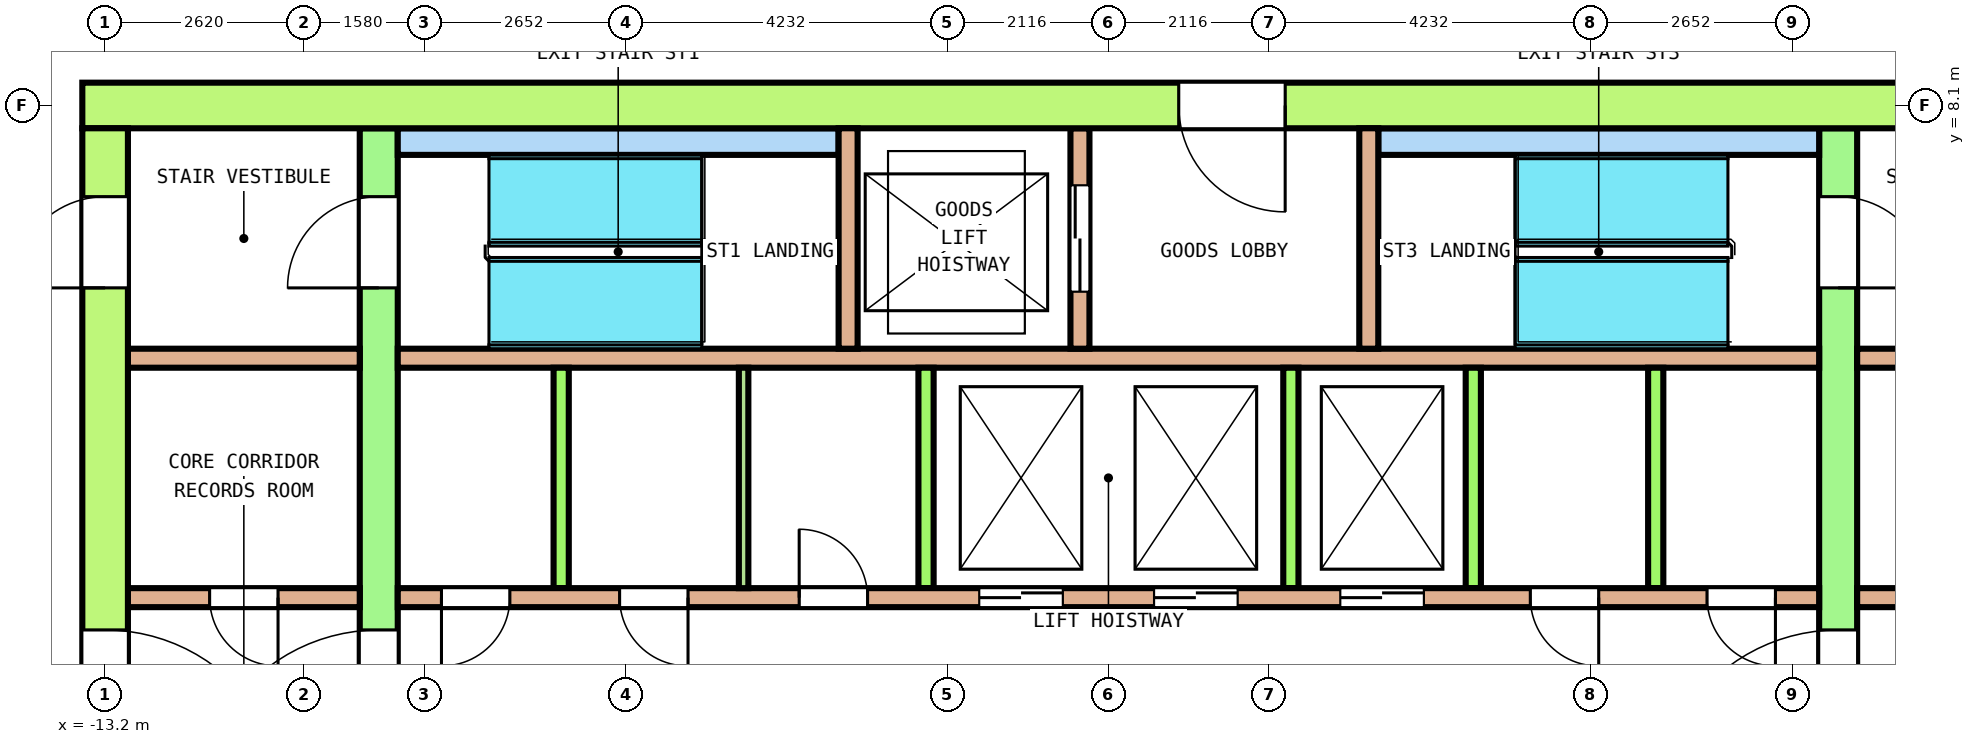
"""IFC4 building model, lengths in metres.
Left out: names, types, materials, properties, quantities, classifications, styles, units other than length and angle.
Written with IfcOpenShell. Run it as: python <this file> out.ifc"""

import sys

from ifc_helpers import new_model, si_unit, direction, frame, frame_2d, origin, place, context, subcontext, project, spatial, rectangle, extrude, element, fill, save


model = new_model("IFC4")
c1 = context("Model", 3, precision=1e-05, world=origin(), true_north=direction((0.0, 1.0)))
c2 = subcontext(c1, "Body", "Model", "MODEL_VIEW")
j1 = project(units=[si_unit("LENGTHUNIT", "METRE"), si_unit("PLANEANGLEUNIT", "RADIAN")], contexts=[c1])
p1 = place(None, origin())
s1 = spatial("IfcSite", under=j1, at=p1, CompositionType="ELEMENT")
p2 = place(p1, origin())
s2 = spatial("IfcBuilding", under=s1, at=p2, CompositionType="ELEMENT")
p3 = place(p2, frame((0.0, 0.0, 241.4)))
s3 = spatial("IfcBuildingStorey", under=s2, at=p3, CompositionType="ELEMENT", Elevation=241.4)
p4 = place(p3, frame((-13.5, 8.1, 0.0), z_axis=(0.0, 0.0, 1.0), x_axis=(1.0, 0.0, 0.0)))
e1 = element("IfcWall", 1, at=p4, inside=s3, PredefinedType="SHEAR", context=c2, shape_type="SweptSolid", body=[
    extrude(rectangle(XDim=27.0, YDim=0.6, at=frame_2d((13.5, 0.0))), origin(), (0.0, 0.0, 1.0), 3.7),
])
p5 = place(p4, frame((14.425, 0.0, 0.0)))
e2 = element("IfcOpeningElement", 2, at=p5, cuts=e1, PredefinedType="OPENING", context=c2, shape_type="SweptSolid", body=[
    extrude(rectangle(XDim=1.4, YDim=2.1, at=frame_2d((0.7, 1.05))), frame((0.0, 0.31, 0.0), z_axis=(0.0, -1.0, 0.0), x_axis=(1.0, 0.0, 0.0)), (0.0, 0.0, 1.0), 0.62),
])
p6 = place(p3, frame((-13.2, -7.8, 0.0), z_axis=(0.0, 0.0, 1.0), x_axis=(0.0, 1.0, 0.0)))
e3 = element("IfcWall", 3, at=p6, inside=s3, PredefinedType="SHEAR", context=c2, shape_type="SweptSolid", body=[
    extrude(rectangle(XDim=15.6, YDim=0.6, at=frame_2d((7.8, 0.0))), origin(), (0.0, 0.0, 1.0), 3.7),
])
p7 = place(p6, frame((6.6, 0.0, 0.0)))
e4 = element("IfcOpeningElement", 4, at=p7, cuts=e3, PredefinedType="OPENING", context=c2, shape_type="SweptSolid", body=[
    extrude(rectangle(XDim=2.4, YDim=2.1, at=frame_2d((1.2, 1.05))), frame((0.0, 0.31, 0.0), z_axis=(0.0, -1.0, 0.0), x_axis=(1.0, 0.0, 0.0)), (0.0, 0.0, 1.0), 0.62),
])
p8 = place(p6, frame((13.5, 0.0, 0.0)))
e5 = element("IfcOpeningElement", 5, at=p8, cuts=e3, PredefinedType="OPENING", context=c2, shape_type="SweptSolid", body=[
    extrude(rectangle(XDim=1.2, YDim=2.1, at=frame_2d((0.6, 1.05))), frame((0.0, 0.31, 0.0), z_axis=(0.0, -1.0, 0.0), x_axis=(1.0, 0.0, 0.0)), (0.0, 0.0, 1.0), 0.62),
])
p9 = place(p6, frame((0.9, 0.0, 0.0)))
e6 = element("IfcOpeningElement", 6, at=p9, cuts=e3, PredefinedType="OPENING", context=c2, shape_type="SweptSolid", body=[
    extrude(rectangle(XDim=1.2, YDim=2.1, at=frame_2d((0.6, 1.05))), frame((0.0, 0.31, 0.0), z_axis=(0.0, -1.0, 0.0), x_axis=(1.0, 0.0, 0.0)), (0.0, 0.0, 1.0), 0.62),
])
p10 = place(p3, frame((-9.6, -7.8, 0.0), z_axis=(0.0, 0.0, 1.0), x_axis=(0.0, 1.0, 0.0)))
e7 = element("IfcWall", 7, at=p10, inside=s3, PredefinedType="SHEAR", context=c2, shape_type="SweptSolid", body=[
    extrude(rectangle(XDim=15.6, YDim=0.5, at=frame_2d((7.8, 0.0))), origin(), (0.0, 0.0, 1.0), 3.7),
])
p11 = place(p10, frame((6.6, 0.0, 0.0)))
e8 = element("IfcOpeningElement", 8, at=p11, cuts=e7, PredefinedType="OPENING", context=c2, shape_type="SweptSolid", body=[
    extrude(rectangle(XDim=2.4, YDim=2.1, at=frame_2d((1.2, 1.05))), frame((0.0, 0.26, 0.0), z_axis=(0.0, -1.0, 0.0), x_axis=(1.0, 0.0, 0.0)), (0.0, 0.0, 1.0), 0.52),
])
p12 = place(p10, frame((13.5, 0.0, 0.0)))
e9 = element("IfcOpeningElement", 9, at=p12, cuts=e7, PredefinedType="OPENING", context=c2, shape_type="SweptSolid", body=[
    extrude(rectangle(XDim=1.2, YDim=2.1, at=frame_2d((0.6, 1.05))), frame((0.0, 0.26, 0.0), z_axis=(0.0, -1.0, 0.0), x_axis=(1.0, 0.0, 0.0)), (0.0, 0.0, 1.0), 0.52),
])
p13 = place(p10, frame((0.9, 0.0, 0.0)))
e10 = element("IfcOpeningElement", 10, at=p13, cuts=e7, PredefinedType="OPENING", context=c2, shape_type="SweptSolid", body=[
    extrude(rectangle(XDim=1.2, YDim=2.1, at=frame_2d((0.6, 1.05))), frame((0.0, 0.26, 0.0), z_axis=(0.0, -1.0, 0.0), x_axis=(1.0, 0.0, 0.0)), (0.0, 0.0, 1.0), 0.52),
])
p14 = place(p3, frame((9.6, -7.8, 0.0), z_axis=(0.0, 0.0, 1.0), x_axis=(0.0, 1.0, 0.0)))
e11 = element("IfcWall", 11, at=p14, inside=s3, PredefinedType="SHEAR", context=c2, shape_type="SweptSolid", body=[
    extrude(rectangle(XDim=15.6, YDim=0.5, at=frame_2d((7.8, 0.0))), origin(), (0.0, 0.0, 1.0), 3.7),
])
p15 = place(p14, frame((6.6, 0.0, 0.0)))
e12 = element("IfcOpeningElement", 12, at=p15, cuts=e11, PredefinedType="OPENING", context=c2, shape_type="SweptSolid", body=[
    extrude(rectangle(XDim=2.4, YDim=2.1, at=frame_2d((1.2, 1.05))), frame((0.0, 0.26, 0.0), z_axis=(0.0, -1.0, 0.0), x_axis=(1.0, 0.0, 0.0)), (0.0, 0.0, 1.0), 0.52),
])
p16 = place(p14, frame((13.5, 0.0, 0.0)))
e13 = element("IfcOpeningElement", 13, at=p16, cuts=e11, PredefinedType="OPENING", context=c2, shape_type="SweptSolid", body=[
    extrude(rectangle(XDim=1.2, YDim=2.1, at=frame_2d((0.6, 1.05))), frame((0.0, 0.26, 0.0), z_axis=(0.0, -1.0, 0.0), x_axis=(1.0, 0.0, 0.0)), (0.0, 0.0, 1.0), 0.52),
])
p17 = place(p14, frame((1.0, 0.0, 0.0)))
e14 = element("IfcOpeningElement", 14, at=p17, cuts=e11, PredefinedType="OPENING", context=c2, shape_type="SweptSolid", body=[
    extrude(rectangle(XDim=1.0, YDim=2.1, at=frame_2d((0.5, 1.05))), frame((0.0, 0.26, 0.0), z_axis=(0.0, -1.0, 0.0), x_axis=(1.0, 0.0, 0.0)), (0.0, 0.0, 1.0), 0.52),
])
p18 = place(p3, frame((-12.9, 1.625, 0.0), z_axis=(0.0, 0.0, 1.0), x_axis=(1.0, 0.0, 0.0)))
e15 = element("IfcWall", 15, at=p18, inside=s3, PredefinedType="SOLIDWALL", context=c2, shape_type="SweptSolid", body=[
    extrude(rectangle(XDim=3.05, YDim=0.25, at=frame_2d((1.525, 0.0))), origin(), (0.0, 0.0, 1.0), 3.7),
])
p19 = place(p18, frame((1.075, 0.0, 0.0)))
e16 = element("IfcOpeningElement", 16, at=p19, cuts=e15, PredefinedType="OPENING", context=c2, shape_type="SweptSolid", body=[
    extrude(rectangle(XDim=0.9, YDim=2.1, at=frame_2d((0.45, 1.05))), frame((0.0, 0.135, 0.0), z_axis=(0.0, -1.0, 0.0), x_axis=(1.0, 0.0, 0.0)), (0.0, 0.0, 1.0), 0.27),
])
p20 = place(p3, frame((-9.35, 1.625, 0.0), z_axis=(0.0, 0.0, 1.0), x_axis=(1.0, 0.0, 0.0)))
e17 = element("IfcWall", 17, at=p20, inside=s3, PredefinedType="SOLIDWALL", context=c2, shape_type="SweptSolid", body=[
    extrude(rectangle(XDim=18.7, YDim=0.25, at=frame_2d((9.35, 0.0))), origin(), (0.0, 0.0, 1.0), 3.7),
])
p21 = place(p20, frame((7.65, 0.0, 0.0)))
e18 = element("IfcOpeningElement", 18, at=p21, cuts=e17, PredefinedType="OPENING", context=c2, shape_type="SweptSolid", body=[
    extrude(rectangle(XDim=1.1, YDim=2.1, at=frame_2d((0.55, 1.05))), frame((0.0, 0.135, 0.0), z_axis=(0.0, -1.0, 0.0), x_axis=(1.0, 0.0, 0.0)), (0.0, 0.0, 1.0), 0.27),
])
p22 = place(p20, frame((9.95, 0.0, 0.0)))
e19 = element("IfcOpeningElement", 19, at=p22, cuts=e17, PredefinedType="OPENING", context=c2, shape_type="SweptSolid", body=[
    extrude(rectangle(XDim=1.1, YDim=2.1, at=frame_2d((0.55, 1.05))), frame((0.0, 0.135, 0.0), z_axis=(0.0, -1.0, 0.0), x_axis=(1.0, 0.0, 0.0)), (0.0, 0.0, 1.0), 0.27),
])
p23 = place(p20, frame((12.4, 0.0, 0.0)))
e20 = element("IfcOpeningElement", 20, at=p23, cuts=e17, PredefinedType="OPENING", context=c2, shape_type="SweptSolid", body=[
    extrude(rectangle(XDim=1.1, YDim=2.1, at=frame_2d((0.55, 1.05))), frame((0.0, 0.135, 0.0), z_axis=(0.0, -1.0, 0.0), x_axis=(1.0, 0.0, 0.0)), (0.0, 0.0, 1.0), 0.27),
])
p24 = place(p20, frame((0.575, 0.0, 0.0)))
e21 = element("IfcOpeningElement", 21, at=p24, cuts=e17, PredefinedType="OPENING", context=c2, shape_type="SweptSolid", body=[
    extrude(rectangle(XDim=0.9, YDim=2.1, at=frame_2d((0.45, 1.05))), frame((0.0, 0.135, 0.0), z_axis=(0.0, -1.0, 0.0), x_axis=(1.0, 0.0, 0.0)), (0.0, 0.0, 1.0), 0.27),
])
p25 = place(p20, frame((2.919, 0.0, 0.0)))
e22 = element("IfcOpeningElement", 22, at=p25, cuts=e17, PredefinedType="OPENING", context=c2, shape_type="SweptSolid", body=[
    extrude(rectangle(XDim=0.9, YDim=2.1, at=frame_2d((0.45, 1.05))), frame((0.0, 0.135, 0.0), z_axis=(0.0, -1.0, 0.0), x_axis=(1.0, 0.0, 0.0)), (0.0, 0.0, 1.0), 0.27),
])
p26 = place(p20, frame((5.281, 0.0, 0.0)))
e23 = element("IfcOpeningElement", 23, at=p26, cuts=e17, PredefinedType="OPENING", context=c2, shape_type="SweptSolid", body=[
    extrude(rectangle(XDim=0.9, YDim=2.1, at=frame_2d((0.45, 1.05))), frame((0.0, 0.135, 0.0), z_axis=(0.0, -1.0, 0.0), x_axis=(1.0, 0.0, 0.0)), (0.0, 0.0, 1.0), 0.27),
])
p27 = place(p20, frame((14.9, 0.0, 0.0)))
e24 = element("IfcOpeningElement", 24, at=p27, cuts=e17, PredefinedType="OPENING", context=c2, shape_type="SweptSolid", body=[
    extrude(rectangle(XDim=0.9, YDim=2.1, at=frame_2d((0.45, 1.05))), frame((0.0, 0.135, 0.0), z_axis=(0.0, -1.0, 0.0), x_axis=(1.0, 0.0, 0.0)), (0.0, 0.0, 1.0), 0.27),
])
p28 = place(p20, frame((17.225, 0.0, 0.0)))
e25 = element("IfcOpeningElement", 25, at=p28, cuts=e17, PredefinedType="OPENING", context=c2, shape_type="SweptSolid", body=[
    extrude(rectangle(XDim=0.9, YDim=2.1, at=frame_2d((0.45, 1.05))), frame((0.0, 0.135, 0.0), z_axis=(0.0, -1.0, 0.0), x_axis=(1.0, 0.0, 0.0)), (0.0, 0.0, 1.0), 0.27),
])
p29 = place(p3, frame((9.85, 1.625, 0.0), z_axis=(0.0, 0.0, 1.0), x_axis=(1.0, 0.0, 0.0)))
e26 = element("IfcWall", 26, at=p29, inside=s3, PredefinedType="SOLIDWALL", context=c2, shape_type="SweptSolid", body=[
    extrude(rectangle(XDim=3.05, YDim=0.25, at=frame_2d((1.525, 0.0))), origin(), (0.0, 0.0, 1.0), 3.7),
])
p30 = place(p29, frame((1.075, 0.0, 0.0)))
e27 = element("IfcOpeningElement", 27, at=p30, cuts=e26, PredefinedType="OPENING", context=c2, shape_type="SweptSolid", body=[
    extrude(rectangle(XDim=0.9, YDim=2.1, at=frame_2d((0.45, 1.05))), frame((0.0, 0.135, 0.0), z_axis=(0.0, -1.0, 0.0), x_axis=(1.0, 0.0, 0.0)), (0.0, 0.0, 1.0), 0.27),
])
p31 = place(p3, frame((-12.9, 4.775, 0.0), z_axis=(0.0, 0.0, 1.0), x_axis=(1.0, 0.0, 0.0)))
e28 = element("IfcWall", 28, at=p31, inside=s3, PredefinedType="SOLIDWALL", context=c2, shape_type="SweptSolid", body=[
    extrude(rectangle(XDim=3.05, YDim=0.25, at=frame_2d((1.525, 0.0))), origin(), (0.0, 0.0, 1.0), 3.7),
])
p32 = place(p3, frame((-9.35, 4.775, 0.0), z_axis=(0.0, 0.0, 1.0), x_axis=(1.0, 0.0, 0.0)))
e29 = element("IfcWall", 29, at=p32, inside=s3, PredefinedType="SOLIDWALL", context=c2, shape_type="SweptSolid", body=[
    extrude(rectangle(XDim=18.7, YDim=0.25, at=frame_2d((9.35, 0.0))), origin(), (0.0, 0.0, 1.0), 3.7),
])
p33 = place(p3, frame((9.85, 4.775, 0.0), z_axis=(0.0, 0.0, 1.0), x_axis=(1.0, 0.0, 0.0)))
e30 = element("IfcWall", 30, at=p33, inside=s3, PredefinedType="SOLIDWALL", context=c2, shape_type="SweptSolid", body=[
    extrude(rectangle(XDim=3.05, YDim=0.25, at=frame_2d((1.525, 0.0))), origin(), (0.0, 0.0, 1.0), 3.7),
])
for number, where, z_axis, x_axis in (
    (31, (-7.2, 1.75, 0.0), (0.0, 0.0, 1.0), (0.0, 1.0, 0.0)),
    (32, (-2.4, 1.75, 0.0), (0.0, 0.0, 1.0), (0.0, 1.0, 0.0)),
    (33, (2.4, 1.75, 0.0), (0.0, 0.0, 1.0), (0.0, 1.0, 0.0)),
    (34, (4.8, 1.75, 0.0), (0.0, 0.0, 1.0), (0.0, 1.0, 0.0)),
    (35, (7.2, 1.75, 0.0), (0.0, 0.0, 1.0), (0.0, 1.0, 0.0)),
):
    element("IfcWall", number, at=place(p3, frame(where, z_axis=z_axis, x_axis=x_axis)), inside=s3, PredefinedType="SOLIDWALL", context=c2, shape_type="SweptSolid", body=[
        extrude(rectangle(XDim=2.9, YDim=0.2, at=frame_2d((1.45, 0.0))), origin(), (0.0, 0.0, 1.0), 3.7),
    ])
for number, where, z_axis, x_axis in (
    (36, (-9.35, 7.625, 0.0), (0.0, 0.0, 1.0), (1.0, 0.0, 0.0)),
    (37, (3.55, 7.625, 0.0), (0.0, 0.0, 1.0), (1.0, 0.0, 0.0)),
):
    element("IfcWall", number, at=place(p3, frame(where, z_axis=z_axis, x_axis=x_axis)), inside=s3, PredefinedType="SOLIDWALL", context=c2, shape_type="SweptSolid", body=[
        extrude(rectangle(XDim=5.8, YDim=0.35, at=frame_2d((2.9, 0.0))), origin(), (0.0, 0.0, 1.0), 3.7),
    ])
p34 = place(p3, frame((-3.425, 4.9, 0.0), z_axis=(0.0, 0.0, 1.0), x_axis=(0.0, 1.0, 0.0)))
e38 = element("IfcWall", 38, at=p34, inside=s3, PredefinedType="SOLIDWALL", context=c2, shape_type="SweptSolid", body=[
    extrude(rectangle(XDim=2.9, YDim=0.25, at=frame_2d((1.45, 0.0))), origin(), (0.0, 0.0, 1.0), 3.7),
])
p35 = place(p3, frame((-0.375, 4.9, 0.0), z_axis=(0.0, 0.0, 1.0), x_axis=(0.0, 1.0, 0.0)))
e39 = element("IfcWall", 39, at=p35, inside=s3, PredefinedType="SOLIDWALL", context=c2, shape_type="SweptSolid", body=[
    extrude(rectangle(XDim=2.9, YDim=0.25, at=frame_2d((1.45, 0.0))), origin(), (0.0, 0.0, 1.0), 3.7),
])
p36 = place(p35, frame((0.75, 0.0, 0.0)))
e40 = element("IfcOpeningElement", 40, at=p36, cuts=e39, PredefinedType="OPENING", context=c2, shape_type="SweptSolid", body=[
    extrude(rectangle(XDim=1.4, YDim=2.1, at=frame_2d((0.7, 1.05))), frame((0.0, 0.135, 0.0), z_axis=(0.0, -1.0, 0.0), x_axis=(1.0, 0.0, 0.0)), (0.0, 0.0, 1.0), 0.27),
])
p37 = place(p3, frame((3.425, 4.9, 0.0), z_axis=(0.0, 0.0, 1.0), x_axis=(0.0, 1.0, 0.0)))
e41 = element("IfcWall", 41, at=p37, inside=s3, PredefinedType="SOLIDWALL", context=c2, shape_type="SweptSolid", body=[
    extrude(rectangle(XDim=2.9, YDim=0.25, at=frame_2d((1.45, 0.0))), origin(), (0.0, 0.0, 1.0), 3.7),
])
p38 = place(p3, frame((-4.8, 1.75, 0.0), z_axis=(0.0, 0.0, 1.0), x_axis=(0.0, 1.0, 0.0)))
e42 = element("IfcWall", 42, at=p38, inside=s3, PredefinedType="PARTITIONING", context=c2, shape_type="SweptSolid", body=[
    extrude(rectangle(XDim=2.9, YDim=0.125, at=frame_2d((1.45, 0.0))), origin(), (0.0, 0.0, 1.0), 3.7),
])
p39 = place(p21, origin())
e43 = element("IfcDoor", 43, at=p39, inside=s3, OperationType="DOUBLE_DOOR_SLIDING", PredefinedType="DOOR", context=c2, shape_type="SweptSolid", body=[
    extrude(rectangle(XDim=1.1, YDim=2.1, at=frame_2d((0.55, 1.05))), frame((0.0, 0.075, 0.0), z_axis=(0.0, -1.0, 0.0), x_axis=(1.0, 0.0, 0.0)), (0.0, 0.0, 1.0), 0.15),
])
fill(e18, e43)
p40 = place(p22, origin())
e44 = element("IfcDoor", 44, at=p40, inside=s3, OperationType="DOUBLE_DOOR_SLIDING", PredefinedType="DOOR", context=c2, shape_type="SweptSolid", body=[
    extrude(rectangle(XDim=1.1, YDim=2.1, at=frame_2d((0.55, 1.05))), frame((0.0, 0.075, 0.0), z_axis=(0.0, -1.0, 0.0), x_axis=(1.0, 0.0, 0.0)), (0.0, 0.0, 1.0), 0.15),
])
fill(e19, e44)
p41 = place(p23, origin())
e45 = element("IfcDoor", 45, at=p41, inside=s3, OperationType="DOUBLE_DOOR_SLIDING", PredefinedType="DOOR", context=c2, shape_type="SweptSolid", body=[
    extrude(rectangle(XDim=1.1, YDim=2.1, at=frame_2d((0.55, 1.05))), frame((0.0, 0.075, 0.0), z_axis=(0.0, -1.0, 0.0), x_axis=(1.0, 0.0, 0.0)), (0.0, 0.0, 1.0), 0.15),
])
fill(e20, e45)
p42 = place(p36, origin())
e46 = element("IfcDoor", 46, at=p42, inside=s3, OperationType="DOUBLE_DOOR_SLIDING", PredefinedType="DOOR", context=c2, shape_type="SweptSolid", body=[
    extrude(rectangle(XDim=1.4, YDim=2.1, at=frame_2d((0.7, 1.05))), frame((0.0, 0.075, 0.0), z_axis=(0.0, -1.0, 0.0), x_axis=(1.0, 0.0, 0.0)), (0.0, 0.0, 1.0), 0.15),
])
fill(e40, e46)
p43 = place(p11, origin())
e47 = element("IfcDoor", 47, at=p43, inside=s3, OperationType="DOUBLE_DOOR_SINGLE_SWING", PredefinedType="DOOR", context=c2, shape_type="SweptSolid", body=[
    extrude(rectangle(XDim=2.4, YDim=2.1, at=frame_2d((1.2, 1.05))), frame((0.0, 0.2, 0.0), z_axis=(0.0, -1.0, 0.0), x_axis=(1.0, 0.0, 0.0)), (0.0, 0.0, 1.0), 0.4),
])
fill(e8, e47)
p44 = place(p15, origin())
e48 = element("IfcDoor", 48, at=p44, inside=s3, OperationType="DOUBLE_DOOR_SINGLE_SWING", PredefinedType="DOOR", context=c2, shape_type="SweptSolid", body=[
    extrude(rectangle(XDim=2.4, YDim=2.1, at=frame_2d((1.2, 1.05))), frame((0.0, 0.2, 0.0), z_axis=(0.0, -1.0, 0.0), x_axis=(1.0, 0.0, 0.0)), (0.0, 0.0, 1.0), 0.4),
])
fill(e12, e48)
p45 = place(p7, origin())
e49 = element("IfcDoor", 49, at=p45, inside=s3, OperationType="DOUBLE_DOOR_SINGLE_SWING", PredefinedType="DOOR", context=c2, shape_type="SweptSolid", body=[
    extrude(rectangle(XDim=2.4, YDim=2.1, at=frame_2d((1.2, 1.05))), frame((0.0, 0.25, 0.0), z_axis=(0.0, -1.0, 0.0), x_axis=(1.0, 0.0, 0.0)), (0.0, 0.0, 1.0), 0.5),
])
fill(e4, e49)
p46 = place(p12, origin())
e50 = element("IfcDoor", 50, at=p46, inside=s3, OperationType="SINGLE_SWING_RIGHT", PredefinedType="DOOR", context=c2, shape_type="SweptSolid", body=[
    extrude(rectangle(XDim=1.2, YDim=2.1, at=frame_2d((0.6, 1.05))), frame((0.0, 0.2, 0.0), z_axis=(0.0, -1.0, 0.0), x_axis=(1.0, 0.0, 0.0)), (0.0, 0.0, 1.0), 0.4),
])
fill(e9, e50)
p47 = place(p8, origin())
e51 = element("IfcDoor", 51, at=p47, inside=s3, OperationType="SINGLE_SWING_LEFT", PredefinedType="DOOR", context=c2, shape_type="SweptSolid", body=[
    extrude(rectangle(XDim=1.2, YDim=2.1, at=frame_2d((0.6, 1.05))), frame((0.0, 0.25, 0.0), z_axis=(0.0, -1.0, 0.0), x_axis=(1.0, 0.0, 0.0)), (0.0, 0.0, 1.0), 0.5),
])
fill(e5, e51)
p48 = place(p16, origin())
e52 = element("IfcDoor", 52, at=p48, inside=s3, OperationType="SINGLE_SWING_RIGHT", PredefinedType="DOOR", context=c2, shape_type="SweptSolid", body=[
    extrude(rectangle(XDim=1.2, YDim=2.1, at=frame_2d((0.6, 1.05))), frame((0.0, 0.2, 0.0), z_axis=(0.0, -1.0, 0.0), x_axis=(1.0, 0.0, 0.0)), (0.0, 0.0, 1.0), 0.4),
])
fill(e13, e52)
p49 = place(p5, origin())
e53 = element("IfcDoor", 53, at=p49, inside=s3, OperationType="DOUBLE_DOOR_SINGLE_SWING", PredefinedType="DOOR", context=c2, shape_type="SweptSolid", body=[
    extrude(rectangle(XDim=1.4, YDim=2.1, at=frame_2d((0.7, 1.05))), frame((0.0, 0.25, 0.0), z_axis=(0.0, -1.0, 0.0), x_axis=(1.0, 0.0, 0.0)), (0.0, 0.0, 1.0), 0.5),
])
fill(e2, e53)
p50 = place(p19, origin())
e54 = element("IfcDoor", 54, at=p50, inside=s3, OperationType="SINGLE_SWING_RIGHT", PredefinedType="DOOR", context=c2, shape_type="SweptSolid", body=[
    extrude(rectangle(XDim=0.9, YDim=2.1, at=frame_2d((0.45, 1.05))), frame((0.0, 0.075, 0.0), z_axis=(0.0, -1.0, 0.0), x_axis=(1.0, 0.0, 0.0)), (0.0, 0.0, 1.0), 0.15),
])
fill(e16, e54)
p51 = place(p24, origin())
e55 = element("IfcDoor", 55, at=p51, inside=s3, OperationType="SINGLE_SWING_LEFT", PredefinedType="DOOR", context=c2, shape_type="SweptSolid", body=[
    extrude(rectangle(XDim=0.9, YDim=2.1, at=frame_2d((0.45, 1.05))), frame((0.0, 0.075, 0.0), z_axis=(0.0, -1.0, 0.0), x_axis=(1.0, 0.0, 0.0)), (0.0, 0.0, 1.0), 0.15),
])
fill(e21, e55)
p52 = place(p25, origin())
e56 = element("IfcDoor", 56, at=p52, inside=s3, OperationType="SINGLE_SWING_RIGHT", PredefinedType="DOOR", context=c2, shape_type="SweptSolid", body=[
    extrude(rectangle(XDim=0.9, YDim=2.1, at=frame_2d((0.45, 1.05))), frame((0.0, 0.075, 0.0), z_axis=(0.0, -1.0, 0.0), x_axis=(1.0, 0.0, 0.0)), (0.0, 0.0, 1.0), 0.15),
])
fill(e22, e56)
p53 = place(p26, origin())
e57 = element("IfcDoor", 57, at=p53, inside=s3, OperationType="SINGLE_SWING_LEFT", PredefinedType="DOOR", context=c2, shape_type="SweptSolid", body=[
    extrude(rectangle(XDim=0.9, YDim=2.1, at=frame_2d((0.45, 1.05))), frame((0.0, 0.075, 0.0), z_axis=(0.0, -1.0, 0.0), x_axis=(1.0, 0.0, 0.0)), (0.0, 0.0, 1.0), 0.15),
])
fill(e23, e57)
p54 = place(p27, origin())
e58 = element("IfcDoor", 58, at=p54, inside=s3, OperationType="SINGLE_SWING_RIGHT", PredefinedType="DOOR", context=c2, shape_type="SweptSolid", body=[
    extrude(rectangle(XDim=0.9, YDim=2.1, at=frame_2d((0.45, 1.05))), frame((0.0, 0.075, 0.0), z_axis=(0.0, -1.0, 0.0), x_axis=(1.0, 0.0, 0.0)), (0.0, 0.0, 1.0), 0.15),
])
fill(e24, e58)
p55 = place(p28, origin())
e59 = element("IfcDoor", 59, at=p55, inside=s3, OperationType="SINGLE_SWING_LEFT", PredefinedType="DOOR", context=c2, shape_type="SweptSolid", body=[
    extrude(rectangle(XDim=0.9, YDim=2.1, at=frame_2d((0.45, 1.05))), frame((0.0, 0.075, 0.0), z_axis=(0.0, -1.0, 0.0), x_axis=(1.0, 0.0, 0.0)), (0.0, 0.0, 1.0), 0.15),
])
fill(e25, e59)
save(model, sys.argv[1])
